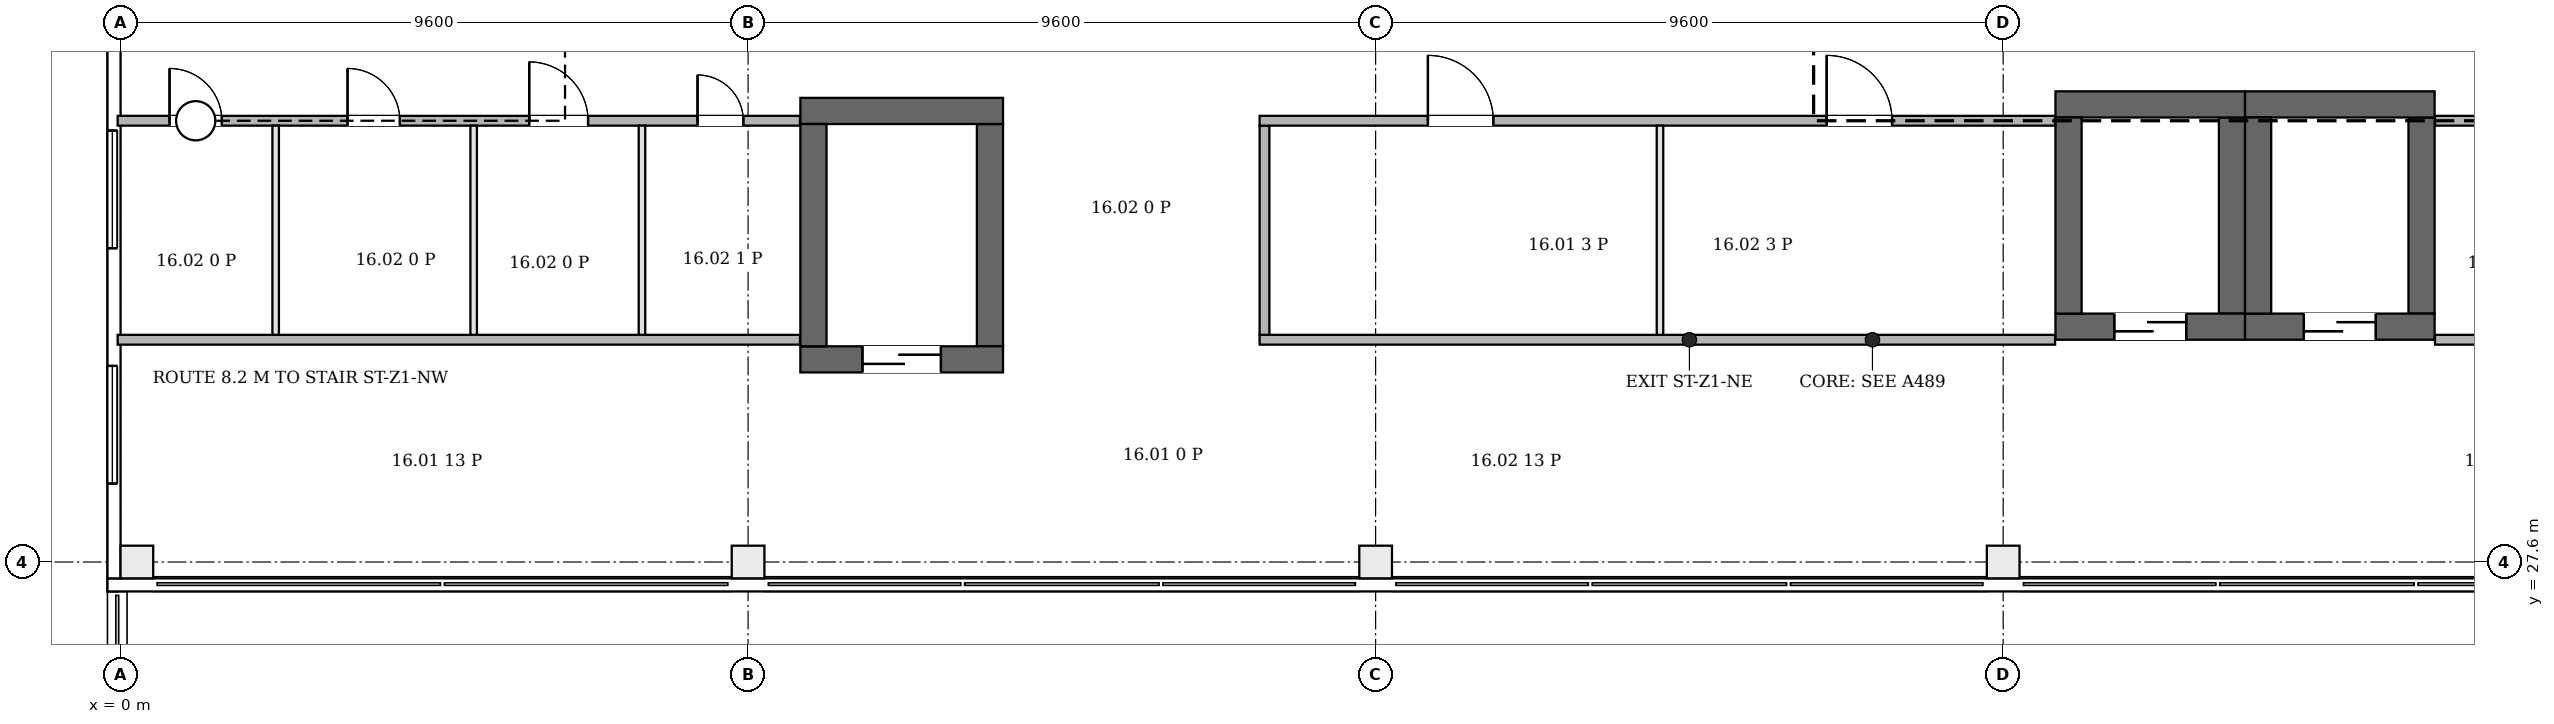
"""IFC4 building model, lengths in metres.
Left out: names, types, materials, properties, quantities, classifications, styles, units other than length and angle.
Written with IfcOpenShell. Run it as: python <this file> out.ifc"""

import sys

from ifc_helpers import new_model, si_unit, direction, frame, frame_2d, origin, origin_2d, place, context, subcontext, project, spatial, rectangle, extrude, element, fill, save


model = new_model("IFC4")
c1 = context("Model", 3, precision=1e-05, world=origin(), true_north=direction((0.0, 1.0)))
c2 = subcontext(c1, "Body", "Model", "MODEL_VIEW")
j1 = project(units=[si_unit("LENGTHUNIT", "METRE"), si_unit("PLANEANGLEUNIT", "RADIAN")], contexts=[c1])
p1 = place(None, origin())
s1 = spatial("IfcSite", under=j1, at=p1, CompositionType="ELEMENT")
p2 = place(p1, origin())
s2 = spatial("IfcBuilding", under=s1, at=p2, CompositionType="ELEMENT")
p3 = place(p2, frame((0.0, 0.0, 78.1)))
s3 = spatial("IfcBuildingStorey", under=s2, at=p3, CompositionType="ELEMENT", Elevation=78.1)
p4 = place(p3, frame((10.4, 30.7, 0.0), z_axis=(0.0, 0.0, 1.0), x_axis=(1.0, 0.0, 0.0)))
e1 = element("IfcWall", 1, at=p4, inside=s3, PredefinedType="SHEAR", context=c2, shape_type="SweptSolid", body=[
    extrude(rectangle(XDim=3.1, YDim=0.4, at=frame_2d((1.55, 0.0))), origin(), (0.0, 0.0, 1.0), 7.6),
])
p5 = place(p4, frame((0.95, 0.0, 0.0)))
e2 = element("IfcOpeningElement", 2, at=p5, cuts=e1, PredefinedType="OPENING", context=c2, shape_type="SweptSolid", body=[
    extrude(rectangle(XDim=1.2, YDim=2.1, at=frame_2d((0.6, 1.05))), frame((0.0, 0.21, 0.0), z_axis=(0.0, -1.0, 0.0), x_axis=(1.0, 0.0, 0.0)), (0.0, 0.0, 1.0), 0.42),
])
p6 = place(p3, frame((10.4, 34.5, 0.0), z_axis=(0.0, 0.0, 1.0), x_axis=(1.0, 0.0, 0.0)))
e3 = element("IfcWall", 3, at=p6, inside=s3, PredefinedType="SHEAR", context=c2, shape_type="SweptSolid", body=[
    extrude(rectangle(XDim=3.1, YDim=0.4, at=frame_2d((1.55, 0.0))), origin(), (0.0, 0.0, 1.0), 7.6),
])
for number, where, z_axis, x_axis in (
    (4, (10.6, 30.9, 0.0), (0.0, 0.0, 1.0), (0.0, 1.0, 0.0)),
    (5, (13.3, 30.9, 0.0), (0.0, 0.0, 1.0), (0.0, 1.0, 0.0)),
):
    element("IfcWall", number, at=place(p3, frame(where, z_axis=z_axis, x_axis=x_axis)), inside=s3, PredefinedType="SHEAR", context=c2, shape_type="SweptSolid", body=[
        extrude(rectangle(XDim=3.4, YDim=0.4, at=frame_2d((1.7, 0.0))), origin(), (0.0, 0.0, 1.0), 7.6),
    ])
p7 = place(p3, frame((29.6, 31.2, 0.0), z_axis=(0.0, 0.0, 1.0), x_axis=(1.0, 0.0, 0.0)))
e6 = element("IfcWall", 6, at=p7, inside=s3, PredefinedType="SHEAR", context=c2, shape_type="SweptSolid", body=[
    extrude(rectangle(XDim=2.9, YDim=0.4, at=frame_2d((1.45, 0.0))), origin(), (0.0, 0.0, 1.0), 7.6),
])
p8 = place(p7, frame((0.9, 0.0, 0.0)))
e7 = element("IfcOpeningElement", 7, at=p8, cuts=e6, PredefinedType="OPENING", context=c2, shape_type="SweptSolid", body=[
    extrude(rectangle(XDim=1.1, YDim=2.1, at=frame_2d((0.55, 1.05))), frame((0.0, 0.21, 0.0), z_axis=(0.0, -1.0, 0.0), x_axis=(1.0, 0.0, 0.0)), (0.0, 0.0, 1.0), 0.42),
])
p9 = place(p3, frame((29.6, 34.6, 0.0), z_axis=(0.0, 0.0, 1.0), x_axis=(1.0, 0.0, 0.0)))
e8 = element("IfcWall", 8, at=p9, inside=s3, PredefinedType="SHEAR", context=c2, shape_type="SweptSolid", body=[
    extrude(rectangle(XDim=2.9, YDim=0.4, at=frame_2d((1.45, 0.0))), origin(), (0.0, 0.0, 1.0), 7.6),
])
for number, where, z_axis, x_axis in (
    (9, (29.8, 31.4, 0.0), (0.0, 0.0, 1.0), (0.0, 1.0, 0.0)),
    (10, (32.3, 31.4, 0.0), (0.0, 0.0, 1.0), (0.0, 1.0, 0.0)),
):
    element("IfcWall", number, at=place(p3, frame(where, z_axis=z_axis, x_axis=x_axis)), inside=s3, PredefinedType="SHEAR", context=c2, shape_type="SweptSolid", body=[
        extrude(rectangle(XDim=3.0, YDim=0.4, at=frame_2d((1.5, 0.0))), origin(), (0.0, 0.0, 1.0), 7.6),
    ])
p10 = place(p3, frame((32.5, 31.2, 0.0), z_axis=(0.0, 0.0, 1.0), x_axis=(1.0, 0.0, 0.0)))
e11 = element("IfcWall", 11, at=p10, inside=s3, PredefinedType="SHEAR", context=c2, shape_type="SweptSolid", body=[
    extrude(rectangle(XDim=2.9, YDim=0.4, at=frame_2d((1.45, 0.0))), origin(), (0.0, 0.0, 1.0), 7.6),
])
p11 = place(p10, frame((0.9, 0.0, 0.0)))
e12 = element("IfcOpeningElement", 12, at=p11, cuts=e11, PredefinedType="OPENING", context=c2, shape_type="SweptSolid", body=[
    extrude(rectangle(XDim=1.1, YDim=2.1, at=frame_2d((0.55, 1.05))), frame((0.0, 0.21, 0.0), z_axis=(0.0, -1.0, 0.0), x_axis=(1.0, 0.0, 0.0)), (0.0, 0.0, 1.0), 0.42),
])
p12 = place(p3, frame((32.5, 34.6, 0.0), z_axis=(0.0, 0.0, 1.0), x_axis=(1.0, 0.0, 0.0)))
e13 = element("IfcWall", 13, at=p12, inside=s3, PredefinedType="SHEAR", context=c2, shape_type="SweptSolid", body=[
    extrude(rectangle(XDim=2.9, YDim=0.4, at=frame_2d((1.45, 0.0))), origin(), (0.0, 0.0, 1.0), 7.6),
])
for number, where, z_axis, x_axis in (
    (14, (32.7, 31.4, 0.0), (0.0, 0.0, 1.0), (0.0, 1.0, 0.0)),
    (15, (35.2, 31.4, 0.0), (0.0, 0.0, 1.0), (0.0, 1.0, 0.0)),
):
    element("IfcWall", number, at=place(p3, frame(where, z_axis=z_axis, x_axis=x_axis)), inside=s3, PredefinedType="SHEAR", context=c2, shape_type="SweptSolid", body=[
        extrude(rectangle(XDim=3.0, YDim=0.4, at=frame_2d((1.5, 0.0))), origin(), (0.0, 0.0, 1.0), 7.6),
    ])
for number, where, z_axis, x_axis in (
    (16, (0.25, 27.6, 0.0), (0.0, 0.0, 1.0), (1.0, 0.0, 0.0)),
    (17, (9.6, 27.6, 0.0), (0.0, 0.0, 1.0), (1.0, 0.0, 0.0)),
    (18, (19.2, 27.6, 0.0), (0.0, 0.0, 1.0), (1.0, 0.0, 0.0)),
    (19, (28.8, 27.6, 0.0), (0.0, 0.0, 1.0), (1.0, 0.0, 0.0)),
):
    element("IfcColumn", number, at=place(p3, frame(where, z_axis=z_axis, x_axis=x_axis)), inside=s3, PredefinedType="COLUMN", context=c2, shape_type="SweptSolid", body=[
        extrude(rectangle(XDim=0.5, YDim=0.5, at=origin_2d()), origin(), (0.0, 0.0, 1.0), 3.9),
    ])
p13 = place(p3, frame((-0.125, 46.45, 0.0), z_axis=(0.0, 0.0, 1.0), x_axis=(0.0, -1.0, 0.0)))
e20 = element("IfcWall", 20, at=p13, inside=s3, PredefinedType="ELEMENTEDWALL", context=c2, shape_type="SweptSolid", body=[
    extrude(rectangle(XDim=19.3, YDim=0.15, at=frame_2d((9.65, 0.0))), origin(), (0.0, 0.0, 1.0), 3.9),
])
p14 = place(p13, frame((15.85, 0.0, 0.9)))
e21 = element("IfcOpeningElement", 21, at=p14, cuts=e20, PredefinedType="OPENING", context=c2, shape_type="SweptSolid", body=[
    extrude(rectangle(XDim=1.8, YDim=2.6, at=frame_2d((0.9, 1.3))), frame((0.0, 0.085, 0.0), z_axis=(0.0, -1.0, 0.0), x_axis=(1.0, 0.0, 0.0)), (0.0, 0.0, 1.0), 0.17),
])
p15 = place(p13, frame((12.25, 0.0, 0.9)))
e22 = element("IfcOpeningElement", 22, at=p15, cuts=e20, PredefinedType="OPENING", context=c2, shape_type="SweptSolid", body=[
    extrude(rectangle(XDim=1.8, YDim=2.6, at=frame_2d((0.9, 1.3))), frame((0.0, 0.085, 0.0), z_axis=(0.0, -1.0, 0.0), x_axis=(1.0, 0.0, 0.0)), (0.0, 0.0, 1.0), 0.17),
])
p16 = place(p13, frame((8.65, 0.0, 0.9)))
e23 = element("IfcOpeningElement", 23, at=p16, cuts=e20, PredefinedType="OPENING", context=c2, shape_type="SweptSolid", body=[
    extrude(rectangle(XDim=1.8, YDim=2.6, at=frame_2d((0.9, 1.3))), frame((0.0, 0.085, 0.0), z_axis=(0.0, -1.0, 0.0), x_axis=(1.0, 0.0, 0.0)), (0.0, 0.0, 1.0), 0.17),
])
p17 = place(p13, frame((5.05, 0.0, 0.9)))
e24 = element("IfcOpeningElement", 24, at=p17, cuts=e20, PredefinedType="OPENING", context=c2, shape_type="SweptSolid", body=[
    extrude(rectangle(XDim=1.8, YDim=2.6, at=frame_2d((0.9, 1.3))), frame((0.0, 0.085, 0.0), z_axis=(0.0, -1.0, 0.0), x_axis=(1.0, 0.0, 0.0)), (0.0, 0.0, 1.0), 0.17),
])
p18 = place(p13, frame((1.45, 0.0, 0.9)))
e25 = element("IfcOpeningElement", 25, at=p18, cuts=e20, PredefinedType="OPENING", context=c2, shape_type="SweptSolid", body=[
    extrude(rectangle(XDim=1.8, YDim=2.6, at=frame_2d((0.9, 1.3))), frame((0.0, 0.085, 0.0), z_axis=(0.0, -1.0, 0.0), x_axis=(1.0, 0.0, 0.0)), (0.0, 0.0, 1.0), 0.17),
])
p19 = place(p3, frame((-0.199, 27.25, 4.2), z_axis=(0.0, 0.0, 1.0), x_axis=(1.0, 0.0, 0.0)))
e26 = element("IfcWall", 26, at=p19, inside=s3, PredefinedType="PARAPET", context=c2, shape_type="SweptSolid", body=[
    extrude(rectangle(XDim=39.05, YDim=0.2, at=frame_2d((19.525, 0.0))), origin(), (0.0, 0.0, 1.0), 1.1),
])
p20 = place(p3, frame((-0.099, 46.25, 4.2), z_axis=(0.0, 0.0, 1.0), x_axis=(0.0, -1.0, 0.0)))
e27 = element("IfcWall", 27, at=p20, inside=s3, PredefinedType="PARAPET", context=c2, shape_type="SweptSolid", body=[
    extrude(rectangle(XDim=18.9, YDim=0.2, at=frame_2d((9.45, 0.0))), origin(), (0.0, 0.0, 1.0), 1.1),
])
p21 = place(p3, frame((-0.044, 31.0, 0.0), z_axis=(0.0, 0.0, 1.0), x_axis=(1.0, 0.0, 0.0)))
e28 = element("IfcWall", 28, at=p21, inside=s3, PredefinedType="PARTITIONING", context=c2, shape_type="SweptSolid", body=[
    extrude(rectangle(XDim=10.438, YDim=0.15, at=frame_2d((5.219, 0.0))), origin(), (0.0, 0.0, 1.0), 3.9),
])
p22 = place(p3, frame((-0.044, 34.35, 0.0), z_axis=(0.0, 0.0, 1.0), x_axis=(1.0, 0.0, 0.0)))
e29 = element("IfcWall", 29, at=p22, inside=s3, PredefinedType="PARTITIONING", context=c2, shape_type="SweptSolid", body=[
    extrude(rectangle(XDim=10.438, YDim=0.15, at=frame_2d((5.219, 0.0))), origin(), (0.0, 0.0, 1.0), 3.9),
])
p23 = place(p22, frame((0.794, 0.0, 0.0)))
e30 = element("IfcOpeningElement", 30, at=p23, cuts=e29, PredefinedType="OPENING", context=c2, shape_type="SweptSolid", body=[
    extrude(rectangle(XDim=0.8, YDim=2.1, at=frame_2d((0.4, 1.05))), frame((0.0, 0.085, 0.0), z_axis=(0.0, -1.0, 0.0), x_axis=(1.0, 0.0, 0.0)), (0.0, 0.0, 1.0), 0.17),
])
p24 = place(p22, frame((3.517, 0.0, 0.0)))
e31 = element("IfcOpeningElement", 31, at=p24, cuts=e29, PredefinedType="OPENING", context=c2, shape_type="SweptSolid", body=[
    extrude(rectangle(XDim=0.8, YDim=2.1, at=frame_2d((0.4, 1.05))), frame((0.0, 0.085, 0.0), z_axis=(0.0, -1.0, 0.0), x_axis=(1.0, 0.0, 0.0)), (0.0, 0.0, 1.0), 0.17),
])
p25 = place(p22, frame((6.296, 0.0, 0.0)))
e32 = element("IfcOpeningElement", 32, at=p25, cuts=e29, PredefinedType="OPENING", context=c2, shape_type="SweptSolid", body=[
    extrude(rectangle(XDim=0.9, YDim=2.1, at=frame_2d((0.45, 1.05))), frame((0.0, 0.085, 0.0), z_axis=(0.0, -1.0, 0.0), x_axis=(1.0, 0.0, 0.0)), (0.0, 0.0, 1.0), 0.17),
])
p26 = place(p22, frame((8.871, 0.0, 0.0)))
e33 = element("IfcOpeningElement", 33, at=p26, cuts=e29, PredefinedType="OPENING", context=c2, shape_type="SweptSolid", body=[
    extrude(rectangle(XDim=0.7, YDim=2.1, at=frame_2d((0.35, 1.05))), frame((0.0, 0.085, 0.0), z_axis=(0.0, -1.0, 0.0), x_axis=(1.0, 0.0, 0.0)), (0.0, 0.0, 1.0), 0.17),
])
for number, where, z_axis, x_axis in (
    (34, (2.373, 31.075, 0.0), (0.0, 0.0, 1.0), (0.0, 1.0, 0.0)),
    (35, (5.402, 31.075, 0.0), (0.0, 0.0, 1.0), (0.0, 1.0, 0.0)),
    (36, (7.977, 31.075, 0.0), (0.0, 0.0, 1.0), (0.0, 1.0, 0.0)),
):
    element("IfcWall", number, at=place(p3, frame(where, z_axis=z_axis, x_axis=x_axis)), inside=s3, PredefinedType="PARTITIONING", context=c2, shape_type="SweptSolid", body=[
        extrude(rectangle(XDim=3.2, YDim=0.1, at=frame_2d((1.6, 0.0))), origin(), (0.0, 0.0, 1.0), 3.9),
    ])
p27 = place(p3, frame((17.425, 31.0, 0.0), z_axis=(0.0, 0.0, 1.0), x_axis=(1.0, 0.0, 0.0)))
e37 = element("IfcWall", 37, at=p27, inside=s3, PredefinedType="PARTITIONING", context=c2, shape_type="SweptSolid", body=[
    extrude(rectangle(XDim=12.169, YDim=0.15, at=frame_2d((6.084, 0.0))), origin(), (0.0, 0.0, 1.0), 3.9),
])
p28 = place(p3, frame((17.5, 31.075, 0.0), z_axis=(0.0, 0.0, 1.0), x_axis=(0.0, 1.0, 0.0)))
e38 = element("IfcWall", 38, at=p28, inside=s3, PredefinedType="PARTITIONING", context=c2, shape_type="SweptSolid", body=[
    extrude(rectangle(XDim=3.2, YDim=0.15, at=frame_2d((1.6, 0.0))), origin(), (0.0, 0.0, 1.0), 3.9),
])
p29 = place(p3, frame((17.425, 34.35, 0.0), z_axis=(0.0, 0.0, 1.0), x_axis=(1.0, 0.0, 0.0)))
e39 = element("IfcWall", 39, at=p29, inside=s3, PredefinedType="PARTITIONING", context=c2, shape_type="SweptSolid", body=[
    extrude(rectangle(XDim=12.169, YDim=0.15, at=frame_2d((6.084, 0.0))), origin(), (0.0, 0.0, 1.0), 3.9),
])
p30 = place(p29, frame((2.575, 0.0, 0.0)))
e40 = element("IfcOpeningElement", 40, at=p30, cuts=e39, PredefinedType="OPENING", context=c2, shape_type="SweptSolid", body=[
    extrude(rectangle(XDim=1.0, YDim=2.1, at=frame_2d((0.5, 1.05))), frame((0.0, 0.085, 0.0), z_axis=(0.0, -1.0, 0.0), x_axis=(1.0, 0.0, 0.0)), (0.0, 0.0, 1.0), 0.17),
])
p31 = place(p29, frame((8.675, 0.0, 0.0)))
e41 = element("IfcOpeningElement", 41, at=p31, cuts=e39, PredefinedType="OPENING", context=c2, shape_type="SweptSolid", body=[
    extrude(rectangle(XDim=1.0, YDim=2.1, at=frame_2d((0.5, 1.05))), frame((0.0, 0.085, 0.0), z_axis=(0.0, -1.0, 0.0), x_axis=(1.0, 0.0, 0.0)), (0.0, 0.0, 1.0), 0.17),
])
p32 = place(p3, frame((23.55, 31.075, 0.0), z_axis=(0.0, 0.0, 1.0), x_axis=(0.0, 1.0, 0.0)))
e42 = element("IfcWall", 42, at=p32, inside=s3, PredefinedType="PARTITIONING", context=c2, shape_type="SweptSolid", body=[
    extrude(rectangle(XDim=3.2, YDim=0.1, at=frame_2d((1.6, 0.0))), origin(), (0.0, 0.0, 1.0), 3.9),
])
p33 = place(p3, frame((35.406, 31.0, 0.0), z_axis=(0.0, 0.0, 1.0), x_axis=(1.0, 0.0, 0.0)))
e43 = element("IfcWall", 43, at=p33, inside=s3, PredefinedType="PARTITIONING", context=c2, shape_type="SweptSolid", body=[
    extrude(rectangle(XDim=3.288, YDim=0.15, at=frame_2d((1.644, 0.0))), origin(), (0.0, 0.0, 1.0), 3.9),
])
p34 = place(p3, frame((35.406, 34.35, 0.0), z_axis=(0.0, 0.0, 1.0), x_axis=(1.0, 0.0, 0.0)))
e44 = element("IfcWall", 44, at=p34, inside=s3, PredefinedType="PARTITIONING", context=c2, shape_type="SweptSolid", body=[
    extrude(rectangle(XDim=3.288, YDim=0.15, at=frame_2d((1.644, 0.0))), origin(), (0.0, 0.0, 1.0), 3.9),
])
p35 = place(p34, frame((1.144, 0.0, 0.0)))
e45 = element("IfcOpeningElement", 45, at=p35, cuts=e44, PredefinedType="OPENING", context=c2, shape_type="SweptSolid", body=[
    extrude(rectangle(XDim=1.0, YDim=2.1, at=frame_2d((0.5, 1.05))), frame((0.0, 0.085, 0.0), z_axis=(0.0, -1.0, 0.0), x_axis=(1.0, 0.0, 0.0)), (0.0, 0.0, 1.0), 0.17),
])
p36 = place(p14, origin())
e46 = element("IfcWindow", 46, at=p36, inside=s3, PartitioningType="SINGLE_PANEL", PredefinedType="WINDOW", context=c2, shape_type="SweptSolid", body=[
    extrude(rectangle(XDim=1.8, YDim=2.6, at=frame_2d((0.9, 1.3))), frame((0.0, 0.03, 0.0), z_axis=(0.0, -1.0, 0.0), x_axis=(1.0, 0.0, 0.0)), (0.0, 0.0, 1.0), 0.06),
])
fill(e21, e46)
p37 = place(p15, origin())
e47 = element("IfcWindow", 47, at=p37, inside=s3, PartitioningType="SINGLE_PANEL", PredefinedType="WINDOW", context=c2, shape_type="SweptSolid", body=[
    extrude(rectangle(XDim=1.8, YDim=2.6, at=frame_2d((0.9, 1.3))), frame((0.0, 0.03, 0.0), z_axis=(0.0, -1.0, 0.0), x_axis=(1.0, 0.0, 0.0)), (0.0, 0.0, 1.0), 0.06),
])
fill(e22, e47)
p38 = place(p2, frame((0.0, 0.0, 82.3)))
p39 = place(p38, frame((0.0, 0.0, -0.3)))
p40 = place(p39, frame((2.1, 29.95, 0.0)))
p41 = place(p40, frame((0.0, 0.0, 0.25)))
e48 = element("IfcWindow", 48, at=p41, inside=s3, PartitioningType="SINGLE_PANEL", PredefinedType="SKYLIGHT", context=c2, shape_type="SweptSolid", body=[
    extrude(rectangle(XDim=1.8, YDim=3.0, at=origin_2d()), origin(), (0.0, 0.0, 1.0), 0.05),
])
p42 = place(p39, frame((7.6, 29.95, 0.0)))
p43 = place(p42, frame((0.0, 0.0, 0.25)))
e49 = element("IfcWindow", 49, at=p43, inside=s3, PartitioningType="SINGLE_PANEL", PredefinedType="SKYLIGHT", context=c2, shape_type="SweptSolid", body=[
    extrude(rectangle(XDim=1.8, YDim=3.0, at=origin_2d()), origin(), (0.0, 0.0, 1.0), 0.05),
])
p44 = place(p39, frame((16.1, 29.95, 0.0)))
p45 = place(p44, frame((0.0, 0.0, 0.25)))
e50 = element("IfcWindow", 50, at=p45, inside=s3, PartitioningType="SINGLE_PANEL", PredefinedType="SKYLIGHT", context=c2, shape_type="SweptSolid", body=[
    extrude(rectangle(XDim=1.8, YDim=3.0, at=origin_2d()), origin(), (0.0, 0.0, 1.0), 0.05),
])
p46 = place(p39, frame((4.3, 29.65, 0.0)))
p47 = place(p46, frame((0.0, 0.0, 0.25)))
e51 = element("IfcDoor", 51, at=p47, inside=s3, OperationType="SWING_FIXED_LEFT", PredefinedType="TRAPDOOR", context=c2, shape_type="SweptSolid", body=[
    extrude(rectangle(XDim=1.0, YDim=1.0, at=origin_2d()), origin(), (0.0, 0.0, 1.0), 0.05),
])
p48 = place(p5, origin())
e52 = element("IfcDoor", 52, at=p48, inside=s3, OperationType="DOUBLE_DOOR_SLIDING", PredefinedType="DOOR", context=c2, shape_type="SweptSolid", body=[
    extrude(rectangle(XDim=1.2, YDim=2.1, at=frame_2d((0.6, 1.05))), frame((0.0, 0.025, 0.0), z_axis=(0.0, -1.0, 0.0), x_axis=(1.0, 0.0, 0.0)), (0.0, 0.0, 1.0), 0.05),
])
fill(e2, e52)
p49 = place(p8, origin())
e53 = element("IfcDoor", 53, at=p49, inside=s3, OperationType="DOUBLE_DOOR_SLIDING", PredefinedType="DOOR", context=c2, shape_type="SweptSolid", body=[
    extrude(rectangle(XDim=1.1, YDim=2.1, at=frame_2d((0.55, 1.05))), frame((0.0, 0.025, 0.0), z_axis=(0.0, -1.0, 0.0), x_axis=(1.0, 0.0, 0.0)), (0.0, 0.0, 1.0), 0.05),
])
fill(e7, e53)
p50 = place(p11, origin())
e54 = element("IfcDoor", 54, at=p50, inside=s3, OperationType="DOUBLE_DOOR_SLIDING", PredefinedType="DOOR", context=c2, shape_type="SweptSolid", body=[
    extrude(rectangle(XDim=1.1, YDim=2.1, at=frame_2d((0.55, 1.05))), frame((0.0, 0.025, 0.0), z_axis=(0.0, -1.0, 0.0), x_axis=(1.0, 0.0, 0.0)), (0.0, 0.0, 1.0), 0.05),
])
fill(e12, e54)
p51 = place(p23, origin())
e55 = element("IfcDoor", 55, at=p51, inside=s3, OperationType="SINGLE_SWING_RIGHT", PredefinedType="DOOR", context=c2, shape_type="SweptSolid", body=[
    extrude(rectangle(XDim=0.8, YDim=2.1, at=frame_2d((0.4, 1.05))), frame((0.0, 0.025, 0.0), z_axis=(0.0, -1.0, 0.0), x_axis=(1.0, 0.0, 0.0)), (0.0, 0.0, 1.0), 0.05),
])
fill(e30, e55)
p52 = place(p24, origin())
e56 = element("IfcDoor", 56, at=p52, inside=s3, OperationType="SINGLE_SWING_LEFT", PredefinedType="DOOR", context=c2, shape_type="SweptSolid", body=[
    extrude(rectangle(XDim=0.8, YDim=2.1, at=frame_2d((0.4, 1.05))), frame((0.0, 0.025, 0.0), z_axis=(0.0, -1.0, 0.0), x_axis=(1.0, 0.0, 0.0)), (0.0, 0.0, 1.0), 0.05),
])
fill(e31, e56)
p53 = place(p25, origin())
e57 = element("IfcDoor", 57, at=p53, inside=s3, OperationType="SINGLE_SWING_RIGHT", PredefinedType="DOOR", context=c2, shape_type="SweptSolid", body=[
    extrude(rectangle(XDim=0.9, YDim=2.1, at=frame_2d((0.45, 1.05))), frame((0.0, 0.025, 0.0), z_axis=(0.0, -1.0, 0.0), x_axis=(1.0, 0.0, 0.0)), (0.0, 0.0, 1.0), 0.05),
])
fill(e32, e57)
p54 = place(p26, origin())
e58 = element("IfcDoor", 58, at=p54, inside=s3, OperationType="SINGLE_SWING_LEFT", PredefinedType="DOOR", context=c2, shape_type="SweptSolid", body=[
    extrude(rectangle(XDim=0.7, YDim=2.1, at=frame_2d((0.35, 1.05))), frame((0.0, 0.025, 0.0), z_axis=(0.0, -1.0, 0.0), x_axis=(1.0, 0.0, 0.0)), (0.0, 0.0, 1.0), 0.05),
])
fill(e33, e58)
p55 = place(p30, origin())
e59 = element("IfcDoor", 59, at=p55, inside=s3, OperationType="SINGLE_SWING_LEFT", PredefinedType="DOOR", context=c2, shape_type="SweptSolid", body=[
    extrude(rectangle(XDim=1.0, YDim=2.1, at=frame_2d((0.5, 1.05))), frame((0.0, 0.025, 0.0), z_axis=(0.0, -1.0, 0.0), x_axis=(1.0, 0.0, 0.0)), (0.0, 0.0, 1.0), 0.05),
])
fill(e40, e59)
p56 = place(p31, origin())
e60 = element("IfcDoor", 60, at=p56, inside=s3, OperationType="SINGLE_SWING_LEFT", PredefinedType="DOOR", context=c2, shape_type="SweptSolid", body=[
    extrude(rectangle(XDim=1.0, YDim=2.1, at=frame_2d((0.5, 1.05))), frame((0.0, 0.025, 0.0), z_axis=(0.0, -1.0, 0.0), x_axis=(1.0, 0.0, 0.0)), (0.0, 0.0, 1.0), 0.05),
])
fill(e41, e60)
save(model, sys.argv[1])
